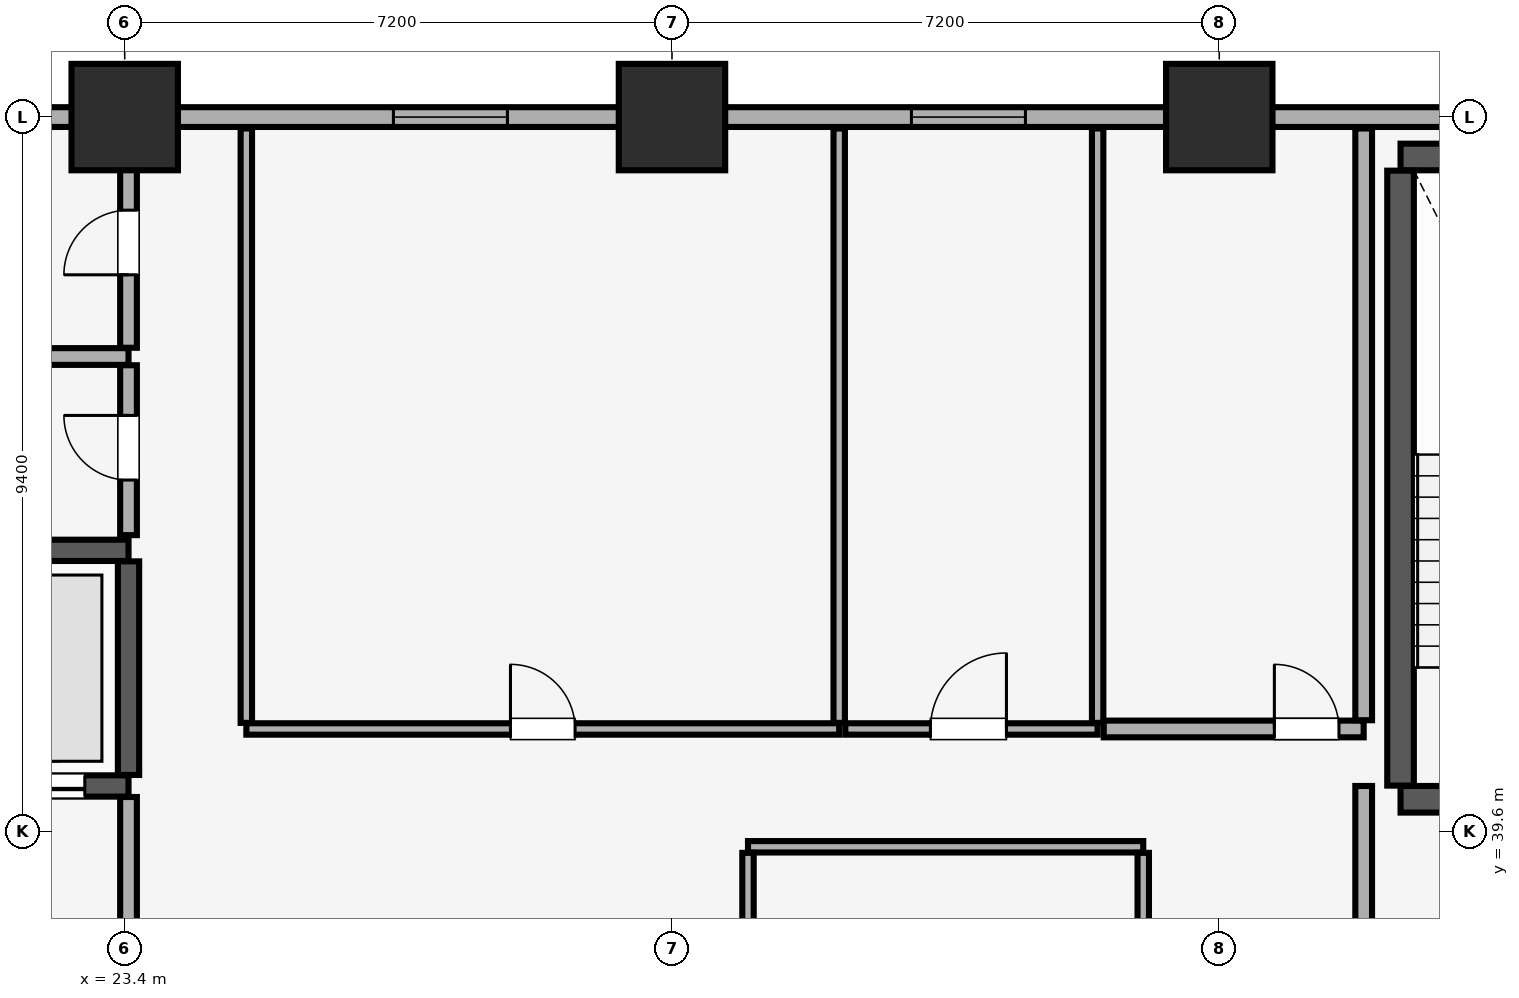
"""IFC4 building model, lengths in metres.
Left out: names, types, materials, properties, quantities, classifications, styles, units other than length and angle.
Written with IfcOpenShell. Run it as: python <this file> out.ifc"""

import sys

from ifc_helpers import new_model, si_unit, direction, frame, frame_2d, origin, origin_2d, place, context, subcontext, project, spatial, rectangle, extrude, element, fill, save


model = new_model("IFC4")
c1 = context("Model", 3, precision=1e-05, world=origin(), true_north=direction((0.0, 1.0)))
c2 = subcontext(c1, "Body", "Model", "MODEL_VIEW")
j1 = project(units=[si_unit("LENGTHUNIT", "METRE"), si_unit("PLANEANGLEUNIT", "RADIAN")], contexts=[c1])
p1 = place(None, origin())
s1 = spatial("IfcSite", under=j1, at=p1, CompositionType="ELEMENT")
p2 = place(p1, origin())
s2 = spatial("IfcBuilding", under=s1, at=p2, CompositionType="ELEMENT")
p3 = place(p2, frame((0.0, 0.0, 72.65)))
s3 = spatial("IfcBuildingStorey", under=s2, at=p3, CompositionType="ELEMENT", Elevation=72.65)
for number, where, z_axis, x_axis in (
    (1, (23.4, 49.0, 0.0), (0.0, 0.0, 1.0), (1.0, 0.0, 0.0)),
    (2, (30.6, 49.0, 0.0), (0.0, 0.0, 1.0), (1.0, 0.0, 0.0)),
    (3, (37.8, 49.0, 0.0), (0.0, 0.0, 1.0), (1.0, 0.0, 0.0)),
):
    element("IfcColumn", number, at=place(p3, frame(where, z_axis=z_axis, x_axis=x_axis)), inside=s3, PredefinedType="COLUMN", context=c2, shape_type="SweptSolid", body=[
        extrude(rectangle(XDim=1.4, YDim=1.4, at=origin_2d()), origin(), (0.0, 0.0, 1.0), 3.51),
    ])
p4 = place(p3, frame((79.8, 49.0, 0.0), z_axis=(0.0, 0.0, 1.0), x_axis=(-1.0, 0.0, 0.0)))
e4 = element("IfcWall", 4, at=p4, inside=s3, PredefinedType="SOLIDWALL", context=c2, shape_type="SweptSolid", body=[
    extrude(rectangle(XDim=75.6, YDim=0.26, at=frame_2d((37.8, 0.0))), origin(), (0.0, 0.0, 1.0), 2.56),
])
p5 = place(p4, frame((72.565, 0.0, 0.85)))
e5 = element("IfcOpeningElement", 5, at=p5, cuts=e4, PredefinedType="OPENING", context=c2, shape_type="SweptSolid", body=[
    extrude(rectangle(XDim=1.5, YDim=1.4, at=frame_2d((0.75, 0.7))), frame((0.0, 0.14, 0.0), z_axis=(0.0, -1.0, 0.0), x_axis=(1.0, 0.0, 0.0)), (0.0, 0.0, 1.0), 0.28),
])
p6 = place(p4, frame((67.45, 0.0, 0.85)))
e6 = element("IfcOpeningElement", 6, at=p6, cuts=e4, PredefinedType="OPENING", context=c2, shape_type="SweptSolid", body=[
    extrude(rectangle(XDim=1.5, YDim=1.4, at=frame_2d((0.75, 0.7))), frame((0.0, 0.14, 0.0), z_axis=(0.0, -1.0, 0.0), x_axis=(1.0, 0.0, 0.0)), (0.0, 0.0, 1.0), 0.28),
])
p7 = place(p4, frame((6.65, 0.0, 0.85)))
e7 = element("IfcOpeningElement", 7, at=p7, cuts=e4, PredefinedType="OPENING", context=c2, shape_type="SweptSolid", body=[
    extrude(rectangle(XDim=1.5, YDim=1.4, at=frame_2d((0.75, 0.7))), frame((0.0, 0.14, 0.0), z_axis=(0.0, -1.0, 0.0), x_axis=(1.0, 0.0, 0.0)), (0.0, 0.0, 1.0), 0.28),
])
p8 = place(p4, frame((1.535, 0.0, 0.85)))
e8 = element("IfcOpeningElement", 8, at=p8, cuts=e4, PredefinedType="OPENING", context=c2, shape_type="SweptSolid", body=[
    extrude(rectangle(XDim=1.5, YDim=1.4, at=frame_2d((0.75, 0.7))), frame((0.0, 0.14, 0.0), z_axis=(0.0, -1.0, 0.0), x_axis=(1.0, 0.0, 0.0)), (0.0, 0.0, 1.0), 0.28),
])
p9 = place(p4, frame((51.365, 0.0, 0.9)))
e9 = element("IfcOpeningElement", 9, at=p9, cuts=e4, PredefinedType="OPENING", context=c2, shape_type="SweptSolid", body=[
    extrude(rectangle(XDim=1.5, YDim=1.4, at=frame_2d((0.75, 0.7))), frame((0.0, 0.14, 0.0), z_axis=(0.0, -1.0, 0.0), x_axis=(1.0, 0.0, 0.0)), (0.0, 0.0, 1.0), 0.28),
])
p10 = place(p4, frame((44.55, 0.0, 0.9)))
e10 = element("IfcOpeningElement", 10, at=p10, cuts=e4, PredefinedType="OPENING", context=c2, shape_type="SweptSolid", body=[
    extrude(rectangle(XDim=1.5, YDim=1.4, at=frame_2d((0.75, 0.7))), frame((0.0, 0.14, 0.0), z_axis=(0.0, -1.0, 0.0), x_axis=(1.0, 0.0, 0.0)), (0.0, 0.0, 1.0), 0.28),
])
p11 = place(p4, frame((28.1, 0.0, 0.9)))
e11 = element("IfcOpeningElement", 11, at=p11, cuts=e4, PredefinedType="OPENING", context=c2, shape_type="SweptSolid", body=[
    extrude(rectangle(XDim=1.5, YDim=1.4, at=frame_2d((0.75, 0.7))), frame((0.0, 0.14, 0.0), z_axis=(0.0, -1.0, 0.0), x_axis=(1.0, 0.0, 0.0)), (0.0, 0.0, 1.0), 0.28),
])
p12 = place(p4, frame((23.485, 0.0, 0.9)))
e12 = element("IfcOpeningElement", 12, at=p12, cuts=e4, PredefinedType="OPENING", context=c2, shape_type="SweptSolid", body=[
    extrude(rectangle(XDim=1.5, YDim=1.4, at=frame_2d((0.75, 0.7))), frame((0.0, 0.14, 0.0), z_axis=(0.0, -1.0, 0.0), x_axis=(1.0, 0.0, 0.0)), (0.0, 0.0, 1.0), 0.28),
])
p13 = place(p3, frame((40.185, 40.025, 0.0), z_axis=(0.0, 0.0, 1.0), x_axis=(1.0, 0.0, 0.0)))
e13 = element("IfcWall", 13, at=p13, inside=s3, PredefinedType="SHEAR", context=c2, shape_type="SweptSolid", body=[
    extrude(rectangle(XDim=3.63, YDim=0.35, at=frame_2d((1.815, 0.0))), origin(), (0.0, 0.0, 1.0), 3.51),
])
p14 = place(p13, frame((1.24, 0.0, 0.0)))
e14 = element("IfcOpeningElement", 14, at=p14, cuts=e13, PredefinedType="OPENING", context=c2, shape_type="SweptSolid", body=[
    extrude(rectangle(XDim=1.15, YDim=2.15, at=frame_2d((0.575, 1.075))), frame((0.0, 0.185, 0.0), z_axis=(0.0, -1.0, 0.0), x_axis=(1.0, 0.0, 0.0)), (0.0, 0.0, 1.0), 0.37),
])
p15 = place(p3, frame((40.185, 48.475, 0.0), z_axis=(0.0, 0.0, 1.0), x_axis=(1.0, 0.0, 0.0)))
e15 = element("IfcWall", 15, at=p15, inside=s3, PredefinedType="SHEAR", context=c2, shape_type="SweptSolid", body=[
    extrude(rectangle(XDim=3.63, YDim=0.35, at=frame_2d((1.815, 0.0))), origin(), (0.0, 0.0, 1.0), 3.51),
])
p16 = place(p3, frame((40.185, 40.205, 0.0), z_axis=(0.0, 0.0, 1.0), x_axis=(0.0, 1.0, 0.0)))
e16 = element("IfcWall", 16, at=p16, inside=s3, PredefinedType="SHEAR", context=c2, shape_type="SweptSolid", body=[
    extrude(rectangle(XDim=8.09, YDim=0.35, at=frame_2d((4.045, 0.0))), origin(), (0.0, 0.0, 1.0), 3.51),
])
p17 = place(p3, frame((21.035, 40.2, 0.0), z_axis=(0.0, 0.0, 1.0), x_axis=(1.0, 0.0, 0.0)))
e17 = element("IfcWall", 17, at=p17, inside=s3, PredefinedType="SHEAR", context=c2, shape_type="SweptSolid", body=[
    extrude(rectangle(XDim=2.415, YDim=0.28, at=frame_2d((1.208, 0.0))), origin(), (0.0, 0.0, 1.0), 3.51),
])
p18 = place(p17, frame((0.54, 0.0, 0.0)))
e18 = element("IfcOpeningElement", 18, at=p18, cuts=e17, PredefinedType="OPENING", context=c2, shape_type="SweptSolid", body=[
    extrude(rectangle(XDim=1.3, YDim=2.3, at=frame_2d((0.65, 1.15))), frame((0.0, 0.15, 0.0), z_axis=(0.0, -1.0, 0.0), x_axis=(1.0, 0.0, 0.0)), (0.0, 0.0, 1.0), 0.3),
])
p19 = place(p3, frame((21.035, 43.3, 0.0), z_axis=(0.0, 0.0, 1.0), x_axis=(1.0, 0.0, 0.0)))
e19 = element("IfcWall", 19, at=p19, inside=s3, PredefinedType="SHEAR", context=c2, shape_type="SweptSolid", body=[
    extrude(rectangle(XDim=2.415, YDim=0.28, at=frame_2d((1.208, 0.0))), origin(), (0.0, 0.0, 1.0), 3.51),
])
p20 = place(p3, frame((23.45, 40.345, 0.0), z_axis=(0.0, 0.0, 1.0), x_axis=(0.0, 1.0, 0.0)))
e20 = element("IfcWall", 20, at=p20, inside=s3, PredefinedType="SHEAR", context=c2, shape_type="SweptSolid", body=[
    extrude(rectangle(XDim=2.81, YDim=0.28, at=frame_2d((1.405, 0.0))), origin(), (0.0, 0.0, 1.0), 3.51),
])
p21 = place(p3, frame((23.45, 34.415, 0.0), z_axis=(0.0, 0.0, 1.0), x_axis=(0.0, 1.0, 0.0)))
e21 = element("IfcWall", 21, at=p21, inside=s3, PredefinedType="PARTITIONING", context=c2, shape_type="SweptSolid", body=[
    extrude(rectangle(XDim=5.64, YDim=0.22, at=frame_2d((2.82, 0.0))), origin(), (0.0, 0.0, 1.0), 3.51),
])
p22 = place(p3, frame((39.7, 34.415, 0.0), z_axis=(0.0, 0.0, 1.0), x_axis=(0.0, 1.0, 0.0)))
e22 = element("IfcWall", 22, at=p22, inside=s3, PredefinedType="PARTITIONING", context=c2, shape_type="SweptSolid", body=[
    extrude(rectangle(XDim=5.785, YDim=0.22, at=frame_2d((2.893, 0.0))), origin(), (0.0, 0.0, 1.0), 3.51),
])
p23 = place(p3, frame((21.035, 45.85, 0.0), z_axis=(0.0, 0.0, 1.0), x_axis=(1.0, 0.0, 0.0)))
e23 = element("IfcWall", 23, at=p23, inside=s3, PredefinedType="PARTITIONING", context=c2, shape_type="SweptSolid", body=[
    extrude(rectangle(XDim=2.415, YDim=0.22, at=frame_2d((1.208, 0.0))), origin(), (0.0, 0.0, 1.0), 3.51),
])
p24 = place(p3, frame((23.45, 43.5, 0.0), z_axis=(0.0, 0.0, 1.0), x_axis=(0.0, 1.0, 0.0)))
e24 = element("IfcWall", 24, at=p24, inside=s3, PredefinedType="PARTITIONING", context=c2, shape_type="SweptSolid", body=[
    extrude(rectangle(XDim=2.235, YDim=0.22, at=frame_2d((1.118, 0.0))), origin(), (0.0, 0.0, 1.0), 3.51),
])
p25 = place(p24, frame((0.725, 0.0, 0.0)))
e25 = element("IfcOpeningElement", 25, at=p25, cuts=e24, PredefinedType="OPENING", context=c2, shape_type="SweptSolid", body=[
    extrude(rectangle(XDim=0.85, YDim=2.1, at=frame_2d((0.425, 1.05))), frame((0.0, 0.12, 0.0), z_axis=(0.0, -1.0, 0.0), x_axis=(1.0, 0.0, 0.0)), (0.0, 0.0, 1.0), 0.24),
])
p26 = place(p3, frame((23.45, 45.965, 0.0), z_axis=(0.0, 0.0, 1.0), x_axis=(0.0, 1.0, 0.0)))
e26 = element("IfcWall", 26, at=p26, inside=s3, PredefinedType="PARTITIONING", context=c2, shape_type="SweptSolid", body=[
    extrude(rectangle(XDim=2.885, YDim=0.22, at=frame_2d((1.442, 0.0))), origin(), (0.0, 0.0, 1.0), 3.51),
])
p27 = place(p26, frame((0.96, 0.0, 0.0)))
e27 = element("IfcOpeningElement", 27, at=p27, cuts=e26, PredefinedType="OPENING", context=c2, shape_type="SweptSolid", body=[
    extrude(rectangle(XDim=0.85, YDim=2.1, at=frame_2d((0.425, 1.05))), frame((0.0, 0.12, 0.0), z_axis=(0.0, -1.0, 0.0), x_axis=(1.0, 0.0, 0.0)), (0.0, 0.0, 1.0), 0.24),
])
p28 = place(p3, frame((31.6, 39.4, 0.0), z_axis=(0.0, 0.0, 1.0), x_axis=(1.0, 0.0, 0.0)))
e28 = element("IfcWall", 28, at=p28, inside=s3, PredefinedType="PARTITIONING", context=c2, shape_type="SweptSolid", body=[
    extrude(rectangle(XDim=5.2, YDim=0.15, at=frame_2d((2.6, 0.0))), origin(), (0.0, 0.0, 1.0), 3.51),
])
for number, where, z_axis, x_axis in (
    (29, (31.6, 34.38, 0.0), (0.0, 0.0, 1.0), (0.0, 1.0, 0.0)),
    (30, (36.8, 34.38, 0.0), (0.0, 0.0, 1.0), (0.0, 1.0, 0.0)),
):
    element("IfcWall", number, at=place(p3, frame(where, z_axis=z_axis, x_axis=x_axis)), inside=s3, PredefinedType="PARTITIONING", context=c2, shape_type="SweptSolid", body=[
        extrude(rectangle(XDim=4.94, YDim=0.15, at=frame_2d((2.47, 0.0))), origin(), (0.0, 0.0, 1.0), 3.51),
    ])
p29 = place(p3, frame((25.0, 40.95, 0.0), z_axis=(0.0, 0.0, 1.0), x_axis=(1.0, 0.0, 0.0)))
e31 = element("IfcWall", 31, at=p29, inside=s3, PredefinedType="PARTITIONING", context=c2, shape_type="SweptSolid", body=[
    extrude(rectangle(XDim=7.8, YDim=0.15, at=frame_2d((3.9, 0.0))), origin(), (0.0, 0.0, 1.0), 3.51),
])
p30 = place(p29, frame((3.475, 0.0, 0.0)))
e32 = element("IfcOpeningElement", 32, at=p30, cuts=e31, PredefinedType="OPENING", context=c2, shape_type="SweptSolid", body=[
    extrude(rectangle(XDim=0.85, YDim=2.1, at=frame_2d((0.425, 1.05))), frame((0.0, 0.085, 0.0), z_axis=(0.0, -1.0, 0.0), x_axis=(1.0, 0.0, 0.0)), (0.0, 0.0, 1.0), 0.17),
])
for number, where, z_axis, x_axis in (
    (33, (25.0, 41.03, 0.0), (0.0, 0.0, 1.0), (0.0, 1.0, 0.0)),
    (34, (32.8, 41.03, 0.0), (0.0, 0.0, 1.0), (0.0, 1.0, 0.0)),
):
    element("IfcWall", number, at=place(p3, frame(where, z_axis=z_axis, x_axis=x_axis)), inside=s3, PredefinedType="PARTITIONING", context=c2, shape_type="SweptSolid", body=[
        extrude(rectangle(XDim=7.82, YDim=0.15, at=frame_2d((3.91, 0.0))), origin(), (0.0, 0.0, 1.0), 3.51),
    ])
p31 = place(p3, frame((32.88, 40.95, 0.0), z_axis=(0.0, 0.0, 1.0), x_axis=(1.0, 0.0, 0.0)))
e35 = element("IfcWall", 35, at=p31, inside=s3, PredefinedType="PARTITIONING", context=c2, shape_type="SweptSolid", body=[
    extrude(rectangle(XDim=3.32, YDim=0.15, at=frame_2d((1.66, 0.0))), origin(), (0.0, 0.0, 1.0), 3.51),
])
p32 = place(p31, frame((1.12, 0.0, 0.0)))
e36 = element("IfcOpeningElement", 36, at=p32, cuts=e35, PredefinedType="OPENING", context=c2, shape_type="SweptSolid", body=[
    extrude(rectangle(XDim=1.0, YDim=2.15, at=frame_2d((0.5, 1.075))), frame((0.0, 0.085, 0.0), z_axis=(0.0, -1.0, 0.0), x_axis=(1.0, 0.0, 0.0)), (0.0, 0.0, 1.0), 0.17),
])
p33 = place(p3, frame((36.2, 41.03, 0.0), z_axis=(0.0, 0.0, 1.0), x_axis=(0.0, 1.0, 0.0)))
e37 = element("IfcWall", 37, at=p33, inside=s3, PredefinedType="PARTITIONING", context=c2, shape_type="SweptSolid", body=[
    extrude(rectangle(XDim=7.82, YDim=0.15, at=frame_2d((3.91, 0.0))), origin(), (0.0, 0.0, 1.0), 3.51),
])
p34 = place(p3, frame((36.28, 40.95, 0.0), z_axis=(0.0, 0.0, 1.0), x_axis=(1.0, 0.0, 0.0)))
e38 = element("IfcWall", 38, at=p34, inside=s3, PredefinedType="PARTITIONING", context=c2, shape_type="SweptSolid", body=[
    extrude(rectangle(XDim=3.42, YDim=0.22, at=frame_2d((1.71, 0.0))), origin(), (0.0, 0.0, 1.0), 3.51),
])
p35 = place(p34, frame((2.245, 0.0, 0.0)))
e39 = element("IfcOpeningElement", 39, at=p35, cuts=e38, PredefinedType="OPENING", context=c2, shape_type="SweptSolid", body=[
    extrude(rectangle(XDim=0.85, YDim=2.1, at=frame_2d((0.425, 1.05))), frame((0.0, 0.12, 0.0), z_axis=(0.0, -1.0, 0.0), x_axis=(1.0, 0.0, 0.0)), (0.0, 0.0, 1.0), 0.24),
])
p36 = place(p3, frame((39.7, 41.065, 0.0), z_axis=(0.0, 0.0, 1.0), x_axis=(0.0, 1.0, 0.0)))
e40 = element("IfcWall", 40, at=p36, inside=s3, PredefinedType="PARTITIONING", context=c2, shape_type="SweptSolid", body=[
    extrude(rectangle(XDim=7.785, YDim=0.22, at=frame_2d((3.893, 0.0))), origin(), (0.0, 0.0, 1.0), 3.51),
])
p37 = place(p9, origin())
e41 = element("IfcWindow", 41, at=p37, inside=s3, PartitioningType="SINGLE_PANEL", PredefinedType="WINDOW", context=c2, shape_type="SweptSolid", body=[
    extrude(rectangle(XDim=1.5, YDim=1.4, at=frame_2d((0.75, 0.7))), frame((0.0, 0.03, 0.0), z_axis=(0.0, -1.0, 0.0), x_axis=(1.0, 0.0, 0.0)), (0.0, 0.0, 1.0), 0.06),
])
fill(e9, e41)
p38 = place(p10, origin())
e42 = element("IfcWindow", 42, at=p38, inside=s3, PartitioningType="SINGLE_PANEL", PredefinedType="WINDOW", context=c2, shape_type="SweptSolid", body=[
    extrude(rectangle(XDim=1.5, YDim=1.4, at=frame_2d((0.75, 0.7))), frame((0.0, 0.03, 0.0), z_axis=(0.0, -1.0, 0.0), x_axis=(1.0, 0.0, 0.0)), (0.0, 0.0, 1.0), 0.06),
])
fill(e10, e42)
p39 = place(p18, origin())
e43 = element("IfcDoor", 43, at=p39, inside=s3, OperationType="DOUBLE_DOOR_SLIDING", PredefinedType="DOOR", context=c2, shape_type="SweptSolid", body=[
    extrude(rectangle(XDim=1.3, YDim=2.3, at=frame_2d((0.65, 1.15))), frame((0.0, 0.025, 0.0), z_axis=(0.0, -1.0, 0.0), x_axis=(1.0, 0.0, 0.0)), (0.0, 0.0, 1.0), 0.05),
])
fill(e18, e43)
p40 = place(p25, origin())
e44 = element("IfcDoor", 44, at=p40, inside=s3, OperationType="SINGLE_SWING_RIGHT", PredefinedType="DOOR", context=c2, shape_type="SweptSolid", body=[
    extrude(rectangle(XDim=0.85, YDim=2.1, at=frame_2d((0.425, 1.05))), frame((0.0, 0.025, 0.0), z_axis=(0.0, -1.0, 0.0), x_axis=(1.0, 0.0, 0.0)), (0.0, 0.0, 1.0), 0.05),
])
fill(e25, e44)
p41 = place(p27, origin())
e45 = element("IfcDoor", 45, at=p41, inside=s3, OperationType="SINGLE_SWING_LEFT", PredefinedType="DOOR", context=c2, shape_type="SweptSolid", body=[
    extrude(rectangle(XDim=0.85, YDim=2.1, at=frame_2d((0.425, 1.05))), frame((0.0, 0.025, 0.0), z_axis=(0.0, -1.0, 0.0), x_axis=(1.0, 0.0, 0.0)), (0.0, 0.0, 1.0), 0.05),
])
fill(e27, e45)
p42 = place(p30, origin())
e46 = element("IfcDoor", 46, at=p42, inside=s3, OperationType="SINGLE_SWING_LEFT", PredefinedType="DOOR", context=c2, shape_type="SweptSolid", body=[
    extrude(rectangle(XDim=0.85, YDim=2.1, at=frame_2d((0.425, 1.05))), frame((0.0, 0.025, 0.0), z_axis=(0.0, -1.0, 0.0), x_axis=(1.0, 0.0, 0.0)), (0.0, 0.0, 1.0), 0.05),
])
fill(e32, e46)
p43 = place(p32, origin())
e47 = element("IfcDoor", 47, at=p43, inside=s3, OperationType="SINGLE_SWING_RIGHT", PredefinedType="DOOR", context=c2, shape_type="SweptSolid", body=[
    extrude(rectangle(XDim=1.0, YDim=2.15, at=frame_2d((0.5, 1.075))), frame((0.0, 0.025, 0.0), z_axis=(0.0, -1.0, 0.0), x_axis=(1.0, 0.0, 0.0)), (0.0, 0.0, 1.0), 0.05),
])
fill(e36, e47)
p44 = place(p35, origin())
e48 = element("IfcDoor", 48, at=p44, inside=s3, OperationType="SINGLE_SWING_LEFT", PredefinedType="DOOR", context=c2, shape_type="SweptSolid", body=[
    extrude(rectangle(XDim=0.85, YDim=2.1, at=frame_2d((0.425, 1.05))), frame((0.0, 0.025, 0.0), z_axis=(0.0, -1.0, 0.0), x_axis=(1.0, 0.0, 0.0)), (0.0, 0.0, 1.0), 0.05),
])
fill(e39, e48)
save(model, sys.argv[1])
